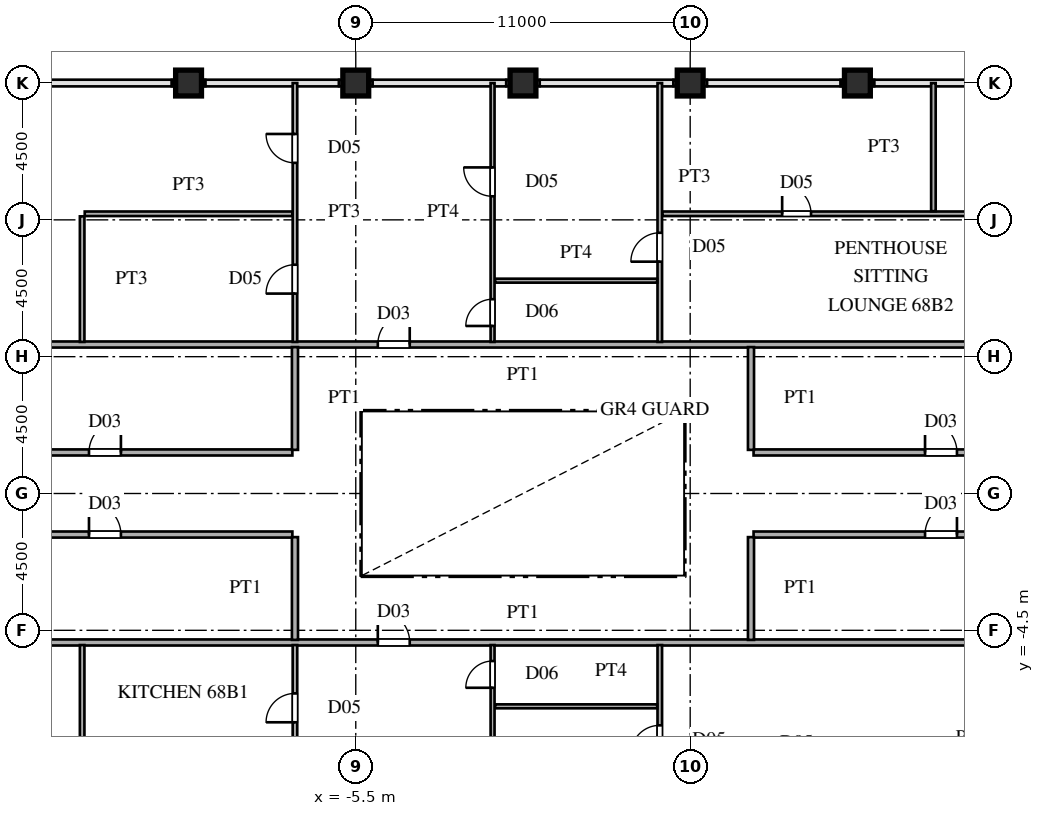
"""IFC4 building model, lengths in metres.
Left out: names, types, materials, properties, quantities, classifications, styles, units other than length and angle.
Written with IfcOpenShell. Run it as: python <this file> out.ifc"""

import sys

from ifc_helpers import new_model, si_unit, direction, frame, frame_2d, origin, origin_2d, place, context, subcontext, project, spatial, rectangle, hollow_rectangle, extrude, source, transform, mapped, element, fill, save


model = new_model("IFC4")
c1 = context("Model", 3, precision=1e-05, world=origin(), true_north=direction((0.0, 1.0)))
c2 = subcontext(c1, "Body", "Model", "MODEL_VIEW")
j1 = project(units=[si_unit("LENGTHUNIT", "METRE"), si_unit("PLANEANGLEUNIT", "RADIAN")], contexts=[c1])
p1 = place(None, origin())
s1 = spatial("IfcSite", under=j1, at=p1, CompositionType="ELEMENT")
p2 = place(p1, origin())
s2 = spatial("IfcBuilding", under=s1, at=p2, CompositionType="ELEMENT")
p3 = place(p2, frame((0.0, 0.0, 258.15)))
s3 = spatial("IfcBuildingStorey", under=s2, at=p3, CompositionType="ELEMENT", Elevation=258.15)
m1 = source(origin(), c2, "Body", "SweptSolid", [
    extrude(hollow_rectangle(XDim=0.85, YDim=0.85, WallThickness=0.036, at=origin_2d()), origin(), (0.0, 0.0, 1.0), 3.75),
])
for number, where, z_axis, x_axis in (
    (1, (-11.0, 13.5, 0.0), (0.0, 0.0, 1.0), (1.0, 0.0, 0.0)),
    (2, (-5.5, 13.5, 0.0), (0.0, 0.0, 1.0), (1.0, 0.0, 0.0)),
    (3, (0.0, 13.5, 0.0), (0.0, 0.0, 1.0), (1.0, 0.0, 0.0)),
    (4, (5.5, 13.5, 0.0), (0.0, 0.0, 1.0), (1.0, 0.0, 0.0)),
    (5, (11.0, 13.5, 0.0), (0.0, 0.0, 1.0), (1.0, 0.0, 0.0)),
):
    element("IfcColumn", number, at=place(p3, frame(where, z_axis=z_axis, x_axis=x_axis)), inside=s3, PredefinedType="COLUMN", context=c2, shape_type="MappedRepresentation", body=[
        mapped(m1, transform((0.0, 0.0, 0.0), scale=1.0)),
    ])
for number, where, z_axis, x_axis in (
    (6, (-11.55, 13.5, 0.0), (0.0, 0.0, 1.0), (1.0, 0.0, 0.0)),
    (7, (-6.05, 13.5, 0.0), (0.0, 0.0, 1.0), (1.0, 0.0, 0.0)),
    (8, (-0.55, 13.5, 0.0), (0.0, 0.0, 1.0), (1.0, 0.0, 0.0)),
    (9, (4.95, 13.5, 0.0), (0.0, 0.0, 1.0), (1.0, 0.0, 0.0)),
    (10, (10.45, 13.5, 0.0), (0.0, 0.0, 1.0), (1.0, 0.0, 0.0)),
):
    element("IfcWall", number, at=place(p3, frame(where, z_axis=z_axis, x_axis=x_axis)), inside=s3, PredefinedType="SOLIDWALL", context=c2, shape_type="SweptSolid", body=[
        extrude(rectangle(XDim=1.1, YDim=0.21, at=frame_2d((0.55, 0.0))), origin(), (0.0, 0.0, 1.0), 3.03),
    ])
p4 = place(p3, frame((-0.915, -7.0, 0.0), z_axis=(0.0, 0.0, 1.0), x_axis=(1.0, 0.0, 0.0)))
e11 = element("IfcWall", 11, at=p4, inside=s3, PredefinedType="PARTITIONING", context=c2, shape_type="SweptSolid", body=[
    extrude(rectangle(XDim=5.33, YDim=0.13, at=frame_2d((2.665, 0.0))), origin(), (0.0, 0.0, 1.0), 3.53),
])
p5 = place(p3, frame((-27.245, -4.9, 0.0), z_axis=(0.0, 0.0, 1.0), x_axis=(1.0, 0.0, 0.0)))
e12 = element("IfcWall", 12, at=p5, inside=s3, PredefinedType="PARTITIONING", context=c2, shape_type="SweptSolid", body=[
    extrude(rectangle(XDim=54.49, YDim=0.2, at=frame_2d((27.245, 0.0))), origin(), (0.0, 0.0, 1.0), 3.53),
])
p6 = place(p5, frame((22.47, 0.0, 0.0)))
e13 = element("IfcOpeningElement", 13, at=p6, cuts=e12, PredefinedType="OPENING", context=c2, shape_type="SweptSolid", body=[
    extrude(rectangle(XDim=1.05, YDim=2.25, at=frame_2d((0.525, 1.125))), frame((0.0, 0.11, 0.0), z_axis=(0.0, -1.0, 0.0), x_axis=(1.0, 0.0, 0.0)), (0.0, 0.0, 1.0), 0.22),
])
p7 = place(p3, frame((-27.245, -1.35, 0.0), z_axis=(0.0, 0.0, 1.0), x_axis=(1.0, 0.0, 0.0)))
e14 = element("IfcWall", 14, at=p7, inside=s3, PredefinedType="PARTITIONING", context=c2, shape_type="SweptSolid", body=[
    extrude(rectangle(XDim=19.66, YDim=0.2, at=frame_2d((9.83, 0.0))), origin(), (0.0, 0.0, 1.0), 3.53),
])
p8 = place(p7, frame((12.97, 0.0, 0.0)))
e15 = element("IfcOpeningElement", 15, at=p8, cuts=e14, PredefinedType="OPENING", context=c2, shape_type="SweptSolid", body=[
    extrude(rectangle(XDim=1.05, YDim=2.25, at=frame_2d((0.525, 1.125))), frame((0.0, 0.11, 0.0), z_axis=(0.0, -1.0, 0.0), x_axis=(1.0, 0.0, 0.0)), (0.0, 0.0, 1.0), 0.22),
])
p9 = place(p3, frame((7.585, -1.35, 0.0), z_axis=(0.0, 0.0, 1.0), x_axis=(1.0, 0.0, 0.0)))
e16 = element("IfcWall", 16, at=p9, inside=s3, PredefinedType="PARTITIONING", context=c2, shape_type="SweptSolid", body=[
    extrude(rectangle(XDim=19.66, YDim=0.2, at=frame_2d((9.83, 0.0))), origin(), (0.0, 0.0, 1.0), 3.53),
])
p10 = place(p9, frame((5.64, 0.0, 0.0)))
e17 = element("IfcOpeningElement", 17, at=p10, cuts=e16, PredefinedType="OPENING", context=c2, shape_type="SweptSolid", body=[
    extrude(rectangle(XDim=1.05, YDim=2.25, at=frame_2d((0.525, 1.125))), frame((0.0, 0.11, 0.0), z_axis=(0.0, -1.0, 0.0), x_axis=(1.0, 0.0, 0.0)), (0.0, 0.0, 1.0), 0.22),
])
p11 = place(p3, frame((-27.245, 1.35, 0.0), z_axis=(0.0, 0.0, 1.0), x_axis=(1.0, 0.0, 0.0)))
e18 = element("IfcWall", 18, at=p11, inside=s3, PredefinedType="PARTITIONING", context=c2, shape_type="SweptSolid", body=[
    extrude(rectangle(XDim=19.66, YDim=0.2, at=frame_2d((9.83, 0.0))), origin(), (0.0, 0.0, 1.0), 3.53),
])
p12 = place(p11, frame((12.97, 0.0, 0.0)))
e19 = element("IfcOpeningElement", 19, at=p12, cuts=e18, PredefinedType="OPENING", context=c2, shape_type="SweptSolid", body=[
    extrude(rectangle(XDim=1.05, YDim=2.25, at=frame_2d((0.525, 1.125))), frame((0.0, 0.11, 0.0), z_axis=(0.0, -1.0, 0.0), x_axis=(1.0, 0.0, 0.0)), (0.0, 0.0, 1.0), 0.22),
])
p13 = place(p3, frame((7.585, 1.35, 0.0), z_axis=(0.0, 0.0, 1.0), x_axis=(1.0, 0.0, 0.0)))
e20 = element("IfcWall", 20, at=p13, inside=s3, PredefinedType="PARTITIONING", context=c2, shape_type="SweptSolid", body=[
    extrude(rectangle(XDim=19.66, YDim=0.2, at=frame_2d((9.83, 0.0))), origin(), (0.0, 0.0, 1.0), 3.53),
])
p14 = place(p13, frame((5.64, 0.0, 0.0)))
e21 = element("IfcOpeningElement", 21, at=p14, cuts=e20, PredefinedType="OPENING", context=c2, shape_type="SweptSolid", body=[
    extrude(rectangle(XDim=1.05, YDim=2.25, at=frame_2d((0.525, 1.125))), frame((0.0, 0.11, 0.0), z_axis=(0.0, -1.0, 0.0), x_axis=(1.0, 0.0, 0.0)), (0.0, 0.0, 1.0), 0.22),
])
p15 = place(p3, frame((-27.245, 4.9, 0.0), z_axis=(0.0, 0.0, 1.0), x_axis=(1.0, 0.0, 0.0)))
e22 = element("IfcWall", 22, at=p15, inside=s3, PredefinedType="PARTITIONING", context=c2, shape_type="SweptSolid", body=[
    extrude(rectangle(XDim=54.49, YDim=0.2, at=frame_2d((27.245, 0.0))), origin(), (0.0, 0.0, 1.0), 3.53),
])
p16 = place(p15, frame((22.47, 0.0, 0.0)))
e23 = element("IfcOpeningElement", 23, at=p16, cuts=e22, PredefinedType="OPENING", context=c2, shape_type="SweptSolid", body=[
    extrude(rectangle(XDim=1.05, YDim=2.25, at=frame_2d((0.525, 1.125))), frame((0.0, 0.11, 0.0), z_axis=(0.0, -1.0, 0.0), x_axis=(1.0, 0.0, 0.0)), (0.0, 0.0, 1.0), 0.22),
])
p17 = place(p3, frame((-0.915, 7.0, 0.0), z_axis=(0.0, 0.0, 1.0), x_axis=(1.0, 0.0, 0.0)))
e24 = element("IfcWall", 24, at=p17, inside=s3, PredefinedType="PARTITIONING", context=c2, shape_type="SweptSolid", body=[
    extrude(rectangle(XDim=5.33, YDim=0.13, at=frame_2d((2.665, 0.0))), origin(), (0.0, 0.0, 1.0), 3.53),
])
p18 = place(p3, frame((-14.415, 9.2, 0.0), z_axis=(0.0, 0.0, 1.0), x_axis=(1.0, 0.0, 0.0)))
e25 = element("IfcWall", 25, at=p18, inside=s3, PredefinedType="PARTITIONING", context=c2, shape_type="SweptSolid", body=[
    extrude(rectangle(XDim=6.83, YDim=0.15, at=frame_2d((3.415, 0.0))), origin(), (0.0, 0.0, 1.0), 3.53),
])
p19 = place(p3, frame((4.585, 9.2, 0.0), z_axis=(0.0, 0.0, 1.0), x_axis=(1.0, 0.0, 0.0)))
e26 = element("IfcWall", 26, at=p19, inside=s3, PredefinedType="PARTITIONING", context=c2, shape_type="SweptSolid", body=[
    extrude(rectangle(XDim=22.66, YDim=0.15, at=frame_2d((11.33, 0.0))), origin(), (0.0, 0.0, 1.0), 3.53),
])
p20 = place(p19, frame((3.94, 0.0, 0.0)))
e27 = element("IfcOpeningElement", 27, at=p20, cuts=e26, PredefinedType="OPENING", context=c2, shape_type="SweptSolid", body=[
    extrude(rectangle(XDim=0.95, YDim=2.15, at=frame_2d((0.475, 1.075))), frame((0.0, 0.085, 0.0), z_axis=(0.0, -1.0, 0.0), x_axis=(1.0, 0.0, 0.0)), (0.0, 0.0, 1.0), 0.17),
])
p21 = place(p19, frame((11.94, 0.0, 0.0)))
e28 = element("IfcOpeningElement", 28, at=p21, cuts=e26, PredefinedType="OPENING", context=c2, shape_type="SweptSolid", body=[
    extrude(rectangle(XDim=0.95, YDim=2.15, at=frame_2d((0.475, 1.075))), frame((0.0, 0.085, 0.0), z_axis=(0.0, -1.0, 0.0), x_axis=(1.0, 0.0, 0.0)), (0.0, 0.0, 1.0), 0.17),
])
p22 = place(p19, frame((18.94, 0.0, 0.0)))
e29 = element("IfcOpeningElement", 29, at=p22, cuts=e26, PredefinedType="OPENING", context=c2, shape_type="SweptSolid", body=[
    extrude(rectangle(XDim=0.95, YDim=2.15, at=frame_2d((0.475, 1.075))), frame((0.0, 0.085, 0.0), z_axis=(0.0, -1.0, 0.0), x_axis=(1.0, 0.0, 0.0)), (0.0, 0.0, 1.0), 0.17),
])
for number, where, z_axis, x_axis in (
    (30, (-14.5, -9.115, 0.0), (0.0, 0.0, 1.0), (0.0, 1.0, 0.0)),
    (31, (-14.5, 4.985, 0.0), (0.0, 0.0, 1.0), (0.0, 1.0, 0.0)),
):
    element("IfcWall", number, at=place(p3, frame(where, z_axis=z_axis, x_axis=x_axis)), inside=s3, PredefinedType="PARTITIONING", context=c2, shape_type="SweptSolid", body=[
        extrude(rectangle(XDim=4.13, YDim=0.15, at=frame_2d((2.065, 0.0))), origin(), (0.0, 0.0, 1.0), 3.53),
    ])
p23 = place(p3, frame((-7.5, -13.5, 0.0), z_axis=(0.0, 0.0, 1.0), x_axis=(0.0, 1.0, 0.0)))
e32 = element("IfcWall", 32, at=p23, inside=s3, PredefinedType="PARTITIONING", context=c2, shape_type="SweptSolid", body=[
    extrude(rectangle(XDim=8.515, YDim=0.15, at=frame_2d((4.257, 0.0))), origin(), (0.0, 0.0, 1.0), 3.53),
])
p24 = place(p23, frame((5.975, 0.0, 0.0)))
e33 = element("IfcOpeningElement", 33, at=p24, cuts=e32, PredefinedType="OPENING", context=c2, shape_type="SweptSolid", body=[
    extrude(rectangle(XDim=0.95, YDim=2.15, at=frame_2d((0.475, 1.075))), frame((0.0, 0.085, 0.0), z_axis=(0.0, -1.0, 0.0), x_axis=(1.0, 0.0, 0.0)), (0.0, 0.0, 1.0), 0.17),
])
p25 = place(p23, frame((1.675, 0.0, 0.0)))
e34 = element("IfcOpeningElement", 34, at=p25, cuts=e32, PredefinedType="OPENING", context=c2, shape_type="SweptSolid", body=[
    extrude(rectangle(XDim=0.95, YDim=2.15, at=frame_2d((0.475, 1.075))), frame((0.0, 0.085, 0.0), z_axis=(0.0, -1.0, 0.0), x_axis=(1.0, 0.0, 0.0)), (0.0, 0.0, 1.0), 0.17),
])
for number, where, z_axis, x_axis in (
    (35, (-7.5, -4.815, 0.0), (0.0, 0.0, 1.0), (0.0, 1.0, 0.0)),
    (36, (-7.5, 1.435, 0.0), (0.0, 0.0, 1.0), (0.0, 1.0, 0.0)),
):
    element("IfcWall", number, at=place(p3, frame(where, z_axis=z_axis, x_axis=x_axis)), inside=s3, PredefinedType="PARTITIONING", context=c2, shape_type="SweptSolid", body=[
        extrude(rectangle(XDim=3.38, YDim=0.2, at=frame_2d((1.69, 0.0))), origin(), (0.0, 0.0, 1.0), 3.53),
    ])
p26 = place(p3, frame((-7.5, 4.985, 0.0), z_axis=(0.0, 0.0, 1.0), x_axis=(0.0, 1.0, 0.0)))
e37 = element("IfcWall", 37, at=p26, inside=s3, PredefinedType="PARTITIONING", context=c2, shape_type="SweptSolid", body=[
    extrude(rectangle(XDim=8.515, YDim=0.15, at=frame_2d((4.257, 0.0))), origin(), (0.0, 0.0, 1.0), 3.53),
])
p27 = place(p26, frame((1.59, 0.0, 0.0)))
e38 = element("IfcOpeningElement", 38, at=p27, cuts=e37, PredefinedType="OPENING", context=c2, shape_type="SweptSolid", body=[
    extrude(rectangle(XDim=0.95, YDim=2.15, at=frame_2d((0.475, 1.075))), frame((0.0, 0.085, 0.0), z_axis=(0.0, -1.0, 0.0), x_axis=(1.0, 0.0, 0.0)), (0.0, 0.0, 1.0), 0.17),
])
p28 = place(p26, frame((5.89, 0.0, 0.0)))
e39 = element("IfcOpeningElement", 39, at=p28, cuts=e37, PredefinedType="OPENING", context=c2, shape_type="SweptSolid", body=[
    extrude(rectangle(XDim=0.95, YDim=2.15, at=frame_2d((0.475, 1.075))), frame((0.0, 0.085, 0.0), z_axis=(0.0, -1.0, 0.0), x_axis=(1.0, 0.0, 0.0)), (0.0, 0.0, 1.0), 0.17),
])
p29 = place(p3, frame((-1.0, -13.5, 0.0), z_axis=(0.0, 0.0, 1.0), x_axis=(0.0, 1.0, 0.0)))
e40 = element("IfcWall", 40, at=p29, inside=s3, PredefinedType="PARTITIONING", context=c2, shape_type="SweptSolid", body=[
    extrude(rectangle(XDim=8.515, YDim=0.13, at=frame_2d((4.257, 0.0))), origin(), (0.0, 0.0, 1.0), 3.53),
])
p30 = place(p29, frame((7.11, 0.0, 0.0)))
e41 = element("IfcOpeningElement", 41, at=p30, cuts=e40, PredefinedType="OPENING", context=c2, shape_type="SweptSolid", body=[
    extrude(rectangle(XDim=0.88, YDim=2.1, at=frame_2d((0.44, 1.05))), frame((0.0, 0.075, 0.0), z_axis=(0.0, -1.0, 0.0), x_axis=(1.0, 0.0, 0.0)), (0.0, 0.0, 1.0), 0.15),
])
p31 = place(p29, frame((2.775, 0.0, 0.0)))
e42 = element("IfcOpeningElement", 42, at=p31, cuts=e40, PredefinedType="OPENING", context=c2, shape_type="SweptSolid", body=[
    extrude(rectangle(XDim=0.95, YDim=2.15, at=frame_2d((0.475, 1.075))), frame((0.0, 0.075, 0.0), z_axis=(0.0, -1.0, 0.0), x_axis=(1.0, 0.0, 0.0)), (0.0, 0.0, 1.0), 0.15),
])
p32 = place(p3, frame((-1.0, 4.985, 0.0), z_axis=(0.0, 0.0, 1.0), x_axis=(0.0, 1.0, 0.0)))
e43 = element("IfcWall", 43, at=p32, inside=s3, PredefinedType="PARTITIONING", context=c2, shape_type="SweptSolid", body=[
    extrude(rectangle(XDim=8.515, YDim=0.13, at=frame_2d((4.257, 0.0))), origin(), (0.0, 0.0, 1.0), 3.53),
])
p33 = place(p32, frame((0.525, 0.0, 0.0)))
e44 = element("IfcOpeningElement", 44, at=p33, cuts=e43, PredefinedType="OPENING", context=c2, shape_type="SweptSolid", body=[
    extrude(rectangle(XDim=0.88, YDim=2.1, at=frame_2d((0.44, 1.05))), frame((0.0, 0.075, 0.0), z_axis=(0.0, -1.0, 0.0), x_axis=(1.0, 0.0, 0.0)), (0.0, 0.0, 1.0), 0.15),
])
p34 = place(p32, frame((4.79, 0.0, 0.0)))
e45 = element("IfcOpeningElement", 45, at=p34, cuts=e43, PredefinedType="OPENING", context=c2, shape_type="SweptSolid", body=[
    extrude(rectangle(XDim=0.95, YDim=2.15, at=frame_2d((0.475, 1.075))), frame((0.0, 0.075, 0.0), z_axis=(0.0, -1.0, 0.0), x_axis=(1.0, 0.0, 0.0)), (0.0, 0.0, 1.0), 0.15),
])
p35 = place(p3, frame((4.5, -13.5, 0.0), z_axis=(0.0, 0.0, 1.0), x_axis=(0.0, 1.0, 0.0)))
e46 = element("IfcWall", 46, at=p35, inside=s3, PredefinedType="PARTITIONING", context=c2, shape_type="SweptSolid", body=[
    extrude(rectangle(XDim=8.515, YDim=0.15, at=frame_2d((4.257, 0.0))), origin(), (0.0, 0.0, 1.0), 3.53),
])
p36 = place(p35, frame((4.925, 0.0, 0.0)))
e47 = element("IfcOpeningElement", 47, at=p36, cuts=e46, PredefinedType="OPENING", context=c2, shape_type="SweptSolid", body=[
    extrude(rectangle(XDim=0.95, YDim=2.15, at=frame_2d((0.475, 1.075))), frame((0.0, 0.085, 0.0), z_axis=(0.0, -1.0, 0.0), x_axis=(1.0, 0.0, 0.0)), (0.0, 0.0, 1.0), 0.17),
])
p37 = place(p3, frame((4.5, 4.985, 0.0), z_axis=(0.0, 0.0, 1.0), x_axis=(0.0, 1.0, 0.0)))
e48 = element("IfcWall", 48, at=p37, inside=s3, PredefinedType="PARTITIONING", context=c2, shape_type="SweptSolid", body=[
    extrude(rectangle(XDim=8.515, YDim=0.15, at=frame_2d((4.257, 0.0))), origin(), (0.0, 0.0, 1.0), 3.53),
])
p38 = place(p37, frame((2.64, 0.0, 0.0)))
e49 = element("IfcOpeningElement", 49, at=p38, cuts=e48, PredefinedType="OPENING", context=c2, shape_type="SweptSolid", body=[
    extrude(rectangle(XDim=0.95, YDim=2.15, at=frame_2d((0.475, 1.075))), frame((0.0, 0.085, 0.0), z_axis=(0.0, -1.0, 0.0), x_axis=(1.0, 0.0, 0.0)), (0.0, 0.0, 1.0), 0.17),
])
for number, where, z_axis, x_axis in (
    (50, (7.5, -4.815, 0.0), (0.0, 0.0, 1.0), (0.0, 1.0, 0.0)),
    (51, (7.5, 1.435, 0.0), (0.0, 0.0, 1.0), (0.0, 1.0, 0.0)),
):
    element("IfcWall", number, at=place(p3, frame(where, z_axis=z_axis, x_axis=x_axis)), inside=s3, PredefinedType="PARTITIONING", context=c2, shape_type="SweptSolid", body=[
        extrude(rectangle(XDim=3.38, YDim=0.2, at=frame_2d((1.69, 0.0))), origin(), (0.0, 0.0, 1.0), 3.53),
    ])
p39 = place(p3, frame((13.5, 9.285, 0.0), z_axis=(0.0, 0.0, 1.0), x_axis=(0.0, 1.0, 0.0)))
e52 = element("IfcWall", 52, at=p39, inside=s3, PredefinedType="PARTITIONING", context=c2, shape_type="SweptSolid", body=[
    extrude(rectangle(XDim=4.215, YDim=0.15, at=frame_2d((2.107, 0.0))), origin(), (0.0, 0.0, 1.0), 3.53),
])
m2 = source(origin(), c2, "Body", "SweptSolid", [
    extrude(rectangle(XDim=1.05, YDim=2.25, at=frame_2d((0.525, 1.125))), frame((0.0, 0.025, 0.0), z_axis=(0.0, -1.0, 0.0), x_axis=(1.0, 0.0, 0.0)), (0.0, 0.0, 1.0), 0.05),
])
p40 = place(p6, origin())
e53 = element("IfcDoor", 53, at=p40, inside=s3, OperationType="SINGLE_SWING_LEFT", PredefinedType="DOOR", context=c2, shape_type="MappedRepresentation", body=[
    mapped(m2, transform((0.0, 0.0, 0.0), scale=1.0)),
])
fill(e13, e53)
p41 = place(p8, origin())
e54 = element("IfcDoor", 54, at=p41, inside=s3, OperationType="SINGLE_SWING_LEFT", PredefinedType="DOOR", context=c2, shape_type="MappedRepresentation", body=[
    mapped(m2, transform((0.0, 0.0, 0.0), scale=1.0)),
])
fill(e15, e54)
p42 = place(p10, origin())
e55 = element("IfcDoor", 55, at=p42, inside=s3, OperationType="SINGLE_SWING_RIGHT", PredefinedType="DOOR", context=c2, shape_type="MappedRepresentation", body=[
    mapped(m2, transform((0.0, 0.0, 0.0), scale=1.0)),
])
fill(e17, e55)
p43 = place(p12, origin())
e56 = element("IfcDoor", 56, at=p43, inside=s3, OperationType="SINGLE_SWING_RIGHT", PredefinedType="DOOR", context=c2, shape_type="MappedRepresentation", body=[
    mapped(m2, transform((0.0, 0.0, 0.0), scale=1.0)),
])
fill(e19, e56)
p44 = place(p14, origin())
e57 = element("IfcDoor", 57, at=p44, inside=s3, OperationType="SINGLE_SWING_LEFT", PredefinedType="DOOR", context=c2, shape_type="MappedRepresentation", body=[
    mapped(m2, transform((0.0, 0.0, 0.0), scale=1.0)),
])
fill(e21, e57)
p45 = place(p16, origin())
e58 = element("IfcDoor", 58, at=p45, inside=s3, OperationType="SINGLE_SWING_RIGHT", PredefinedType="DOOR", context=c2, shape_type="MappedRepresentation", body=[
    mapped(m2, transform((0.0, 0.0, 0.0), scale=1.0)),
])
fill(e23, e58)
m3 = source(origin(), c2, "Body", "SweptSolid", [
    extrude(rectangle(XDim=0.95, YDim=2.15, at=frame_2d((0.475, 1.075))), frame((0.0, 0.025, 0.0), z_axis=(0.0, -1.0, 0.0), x_axis=(1.0, 0.0, 0.0)), (0.0, 0.0, 1.0), 0.05),
])
p46 = place(p20, origin())
e59 = element("IfcDoor", 59, at=p46, inside=s3, OperationType="SINGLE_SWING_LEFT", PredefinedType="DOOR", context=c2, shape_type="MappedRepresentation", body=[
    mapped(m3, transform((0.0, 0.0, 0.0), scale=1.0)),
])
fill(e27, e59)
p47 = place(p24, origin())
e60 = element("IfcDoor", 60, at=p47, inside=s3, OperationType="SINGLE_SWING_LEFT", PredefinedType="DOOR", context=c2, shape_type="MappedRepresentation", body=[
    mapped(m3, transform((0.0, 0.0, 0.0), scale=1.0)),
])
fill(e33, e60)
p48 = place(p27, origin())
e61 = element("IfcDoor", 61, at=p48, inside=s3, OperationType="SINGLE_SWING_LEFT", PredefinedType="DOOR", context=c2, shape_type="MappedRepresentation", body=[
    mapped(m3, transform((0.0, 0.0, 0.0), scale=1.0)),
])
fill(e38, e61)
p49 = place(p28, origin())
e62 = element("IfcDoor", 62, at=p49, inside=s3, OperationType="SINGLE_SWING_RIGHT", PredefinedType="DOOR", context=c2, shape_type="MappedRepresentation", body=[
    mapped(m3, transform((0.0, 0.0, 0.0), scale=1.0)),
])
fill(e39, e62)
m4 = source(origin(), c2, "Body", "SweptSolid", [
    extrude(rectangle(XDim=0.88, YDim=2.1, at=frame_2d((0.44, 1.05))), frame((0.0, 0.025, 0.0), z_axis=(0.0, -1.0, 0.0), x_axis=(1.0, 0.0, 0.0)), (0.0, 0.0, 1.0), 0.05),
])
p50 = place(p30, origin())
e63 = element("IfcDoor", 63, at=p50, inside=s3, OperationType="SINGLE_SWING_LEFT", PredefinedType="DOOR", context=c2, shape_type="MappedRepresentation", body=[
    mapped(m4, transform((0.0, 0.0, 0.0), scale=1.0)),
])
fill(e41, e63)
p51 = place(p33, origin())
e64 = element("IfcDoor", 64, at=p51, inside=s3, OperationType="SINGLE_SWING_LEFT", PredefinedType="DOOR", context=c2, shape_type="MappedRepresentation", body=[
    mapped(m4, transform((0.0, 0.0, 0.0), scale=1.0)),
])
fill(e44, e64)
p52 = place(p34, origin())
e65 = element("IfcDoor", 65, at=p52, inside=s3, OperationType="SINGLE_SWING_RIGHT", PredefinedType="DOOR", context=c2, shape_type="MappedRepresentation", body=[
    mapped(m3, transform((0.0, 0.0, 0.0), scale=1.0)),
])
fill(e45, e65)
p53 = place(p36, origin())
e66 = element("IfcDoor", 66, at=p53, inside=s3, OperationType="SINGLE_SWING_LEFT", PredefinedType="DOOR", context=c2, shape_type="MappedRepresentation", body=[
    mapped(m3, transform((0.0, 0.0, 0.0), scale=1.0)),
])
fill(e47, e66)
p54 = place(p38, origin())
e67 = element("IfcDoor", 67, at=p54, inside=s3, OperationType="SINGLE_SWING_LEFT", PredefinedType="DOOR", context=c2, shape_type="MappedRepresentation", body=[
    mapped(m3, transform((0.0, 0.0, 0.0), scale=1.0)),
])
fill(e49, e67)
save(model, sys.argv[1])
